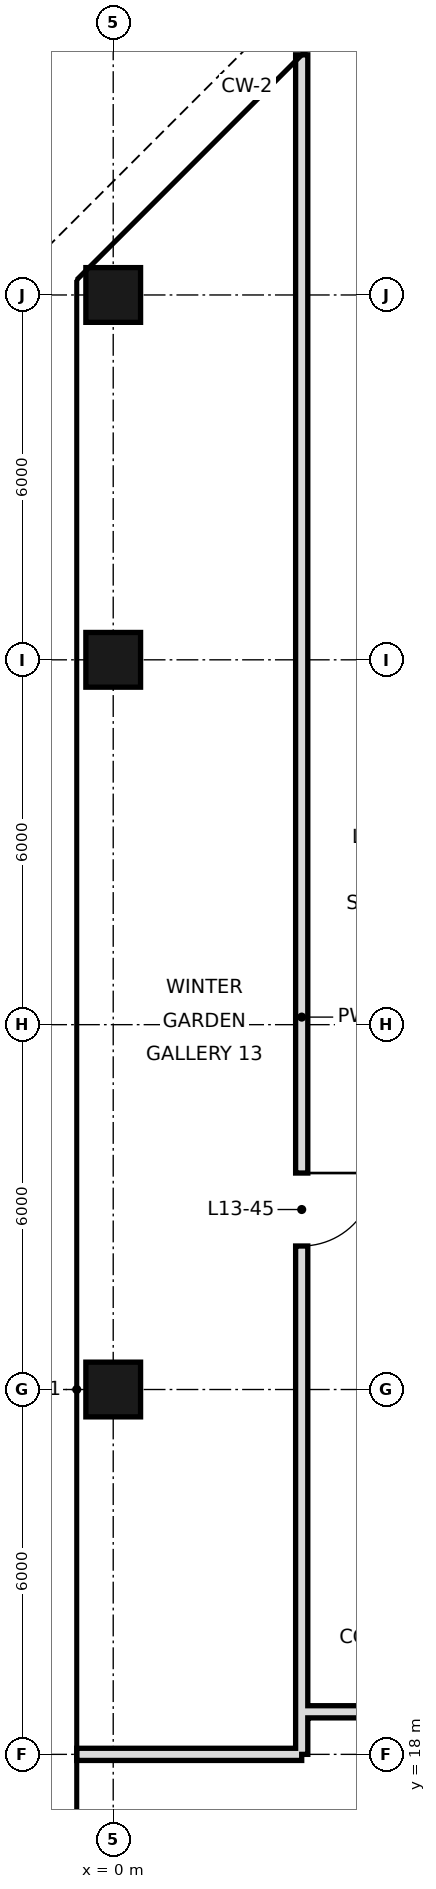
"""IFC4 building model, lengths in metres.
Left out: names, types, materials, properties, quantities, classifications, styles, units other than length and angle.
Written with IfcOpenShell. Run it as: python <this file> out.ifc"""

import sys

from ifc_helpers import new_model, si_unit, direction, frame, frame_2d, origin, origin_2d, place, context, subcontext, project, spatial, rectangle, hollow_rectangle, extrude, element, fill, save


model = new_model("IFC4")
c1 = context("Model", 3, precision=1e-05, world=origin(), true_north=direction((0.0, 1.0)))
c2 = subcontext(c1, "Body", "Model", "MODEL_VIEW")
j1 = project(units=[si_unit("LENGTHUNIT", "METRE"), si_unit("PLANEANGLEUNIT", "RADIAN")], contexts=[c1])
p1 = place(None, origin())
s1 = spatial("IfcSite", under=j1, at=p1, CompositionType="ELEMENT")
p2 = place(p1, origin())
s2 = spatial("IfcBuilding", under=s1, at=p2, CompositionType="ELEMENT")
p3 = place(p2, frame((0.0, 0.0, 67.8)))
s3 = spatial("IfcBuildingStorey", under=s2, at=p3, CompositionType="ELEMENT", Elevation=67.8)
for number, where, z_axis, x_axis in (
    (1, (0.0, 24.0, 0.0), (0.0, 0.0, 1.0), (1.0, 0.0, 0.0)),
    (2, (0.0, 36.0, 0.0), (0.0, 0.0, 1.0), (1.0, 0.0, 0.0)),
    (3, (0.0, 42.0, 0.0), (0.0, 0.0, 1.0), (1.0, 0.0, 0.0)),
):
    element("IfcColumn", number, at=place(p3, frame(where, z_axis=z_axis, x_axis=x_axis)), inside=s3, PredefinedType="COLUMN", context=c2, shape_type="SweptSolid", body=[
        extrude(hollow_rectangle(XDim=0.9, YDim=0.9, WallThickness=0.045, at=origin_2d()), origin(), (0.0, 0.0, 1.0), 3.6),
    ])
p4 = place(p3, frame((3.1, 18.0, 0.0), z_axis=(0.0, 0.0, 1.0), x_axis=(0.0, 1.0, 0.0)))
e4 = element("IfcWall", 4, at=p4, inside=s3, PredefinedType="SOLIDWALL", context=c2, shape_type="SweptSolid", body=[
    extrude(rectangle(XDim=27.949, YDim=0.2, at=frame_2d((13.975, 0.0))), origin(), (0.0, 0.0, 1.0), 2.97),
])
p5 = place(p4, frame((8.36, 0.0, 0.0)))
e5 = element("IfcOpeningElement", 5, at=p5, cuts=e4, PredefinedType="OPENING", context=c2, shape_type="SweptSolid", body=[
    extrude(rectangle(XDim=1.2, YDim=2.4, at=frame_2d((0.6, 1.2))), frame((0.0, 0.11, 0.0), z_axis=(0.0, -1.0, 0.0), x_axis=(1.0, 0.0, 0.0)), (0.0, 0.0, 1.0), 0.22),
])
p6 = place(p3, frame((-0.6, 18.0, 0.0), z_axis=(0.0, 0.0, 1.0), x_axis=(1.0, 0.0, 0.0)))
e6 = element("IfcWall", 6, at=p6, inside=s3, PredefinedType="SOLIDWALL", context=c2, shape_type="SweptSolid", body=[
    extrude(rectangle(XDim=3.7, YDim=0.2, at=frame_2d((1.85, 0.0))), origin(), (0.0, 0.0, 1.0), 2.72),
])
p7 = place(p3, frame((3.1, 18.7, 0.0), z_axis=(0.0, 0.0, 1.0), x_axis=(1.0, 0.0, 0.0)))
e7 = element("IfcWall", 7, at=p7, inside=s3, PredefinedType="SOLIDWALL", context=c2, shape_type="SweptSolid", body=[
    extrude(rectangle(XDim=18.5, YDim=0.2, at=frame_2d((9.25, 0.0))), origin(), (0.0, 0.0, 1.0), 2.72),
])
p8 = place(p5, origin())
e8 = element("IfcDoor", 8, at=p8, inside=s3, OperationType="SINGLE_SWING_RIGHT", PredefinedType="DOOR", context=c2, shape_type="SweptSolid", body=[
    extrude(rectangle(XDim=1.2, YDim=2.4, at=frame_2d((0.6, 1.2))), frame((0.0, 0.025, 0.0), z_axis=(0.0, -1.0, 0.0), x_axis=(1.0, 0.0, 0.0)), (0.0, 0.0, 1.0), 0.05),
])
fill(e5, e8)
save(model, sys.argv[1])
